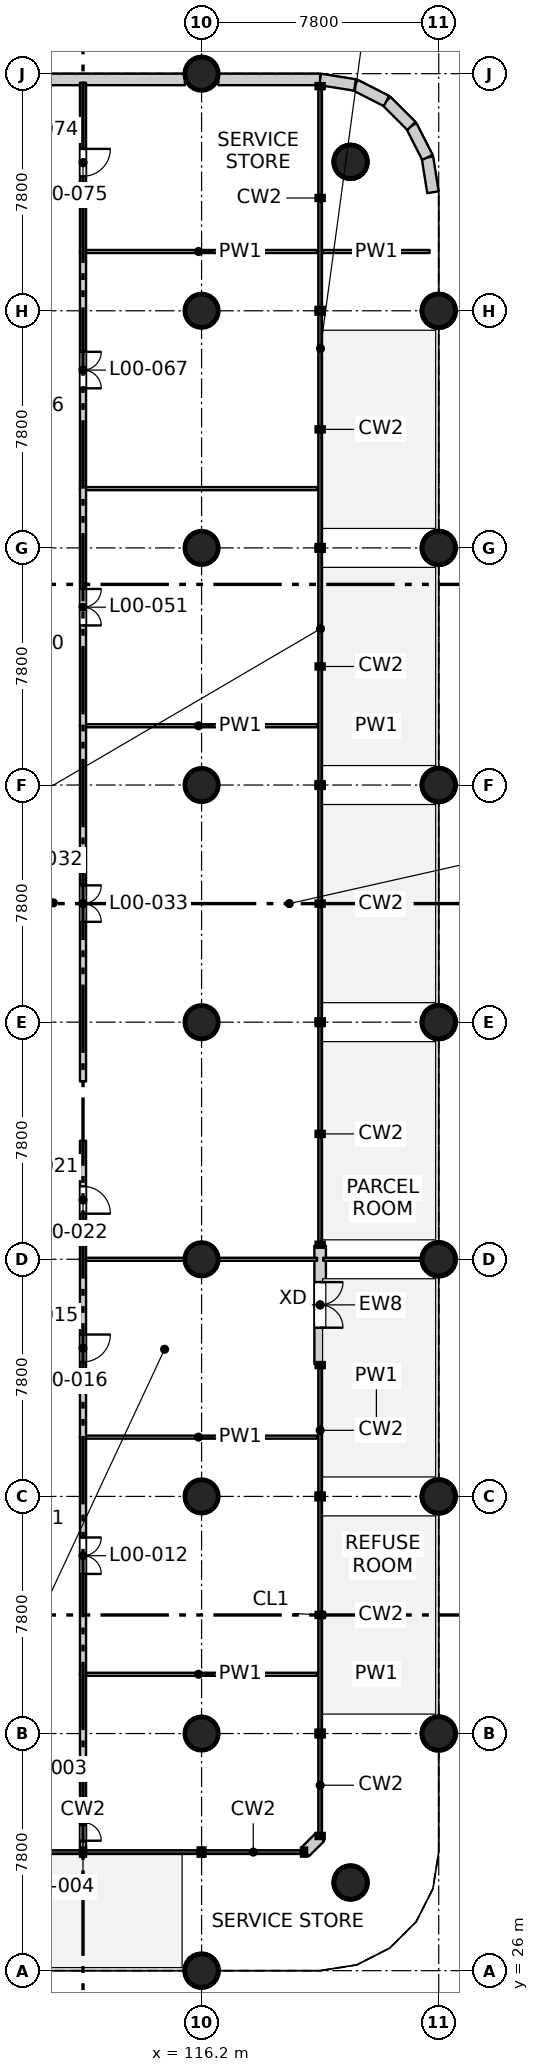
"""IFC4 building model, lengths in metres.
Left out: names, types, materials, properties, quantities, classifications, styles, units other than length and angle.
Written with IfcOpenShell. Run it as: python <this file> out.ifc"""

import sys

from ifc_helpers import new_model, si_unit, direction, frame, frame_2d, origin, origin_2d, place, context, subcontext, project, spatial, rectangle, circle, extrude, element, fill, save


model = new_model("IFC4")
c1 = context("Model", 3, precision=1e-05, world=origin(), true_north=direction((0.0, 1.0)))
c2 = subcontext(c1, "Body", "Model", "MODEL_VIEW")
j1 = project(units=[si_unit("LENGTHUNIT", "METRE"), si_unit("PLANEANGLEUNIT", "RADIAN")], contexts=[c1])
p1 = place(None, origin())
s1 = spatial("IfcSite", under=j1, at=p1, CompositionType="ELEMENT")
p2 = place(p1, origin())
s2 = spatial("IfcBuilding", under=s1, at=p2, CompositionType="ELEMENT")
p3 = place(p2, origin())
s3 = spatial("IfcBuildingStorey", under=s2, at=p3, CompositionType="ELEMENT", Elevation=0.0)
for number, where, z_axis, x_axis in (
    (1, (116.2, 26.0, -0.4), (0.0, 0.0, 1.0), (1.0, 0.0, 0.0)),
    (2, (116.2, 33.8, -0.4), (0.0, 0.0, 1.0), (1.0, 0.0, 0.0)),
    (3, (116.2, 41.6, -0.4), (0.0, 0.0, 1.0), (1.0, 0.0, 0.0)),
    (4, (116.2, 49.4, -0.4), (0.0, 0.0, 1.0), (1.0, 0.0, 0.0)),
    (5, (116.2, 57.2, -0.4), (0.0, 0.0, 1.0), (1.0, 0.0, 0.0)),
    (6, (116.2, 65.0, -0.4), (0.0, 0.0, 1.0), (1.0, 0.0, 0.0)),
    (7, (116.2, 72.8, -0.4), (0.0, 0.0, 1.0), (1.0, 0.0, 0.0)),
    (8, (116.2, 80.6, -0.4), (0.0, 0.0, 1.0), (1.0, 0.0, 0.0)),
    (9, (116.2, 88.4, -0.4), (0.0, 0.0, 1.0), (1.0, 0.0, 0.0)),
    (10, (121.1, 28.9, -0.4), (0.0, 0.0, 1.0), (1.0, 0.0, 0.0)),
    (11, (124.0, 33.8, -0.4), (0.0, 0.0, 1.0), (1.0, 0.0, 0.0)),
    (12, (124.0, 41.6, -0.4), (0.0, 0.0, 1.0), (1.0, 0.0, 0.0)),
    (13, (124.0, 49.4, -0.4), (0.0, 0.0, 1.0), (1.0, 0.0, 0.0)),
    (14, (124.0, 57.2, -0.4), (0.0, 0.0, 1.0), (1.0, 0.0, 0.0)),
    (15, (124.0, 65.0, -0.4), (0.0, 0.0, 1.0), (1.0, 0.0, 0.0)),
    (16, (124.0, 72.8, -0.4), (0.0, 0.0, 1.0), (1.0, 0.0, 0.0)),
    (17, (124.0, 80.6, -0.4), (0.0, 0.0, 1.0), (1.0, 0.0, 0.0)),
    (18, (121.1, 85.5, -0.4), (0.0, 0.0, 1.0), (1.0, 0.0, 0.0)),
):
    element("IfcColumn", number, at=place(p3, frame(where, z_axis=z_axis, x_axis=x_axis)), inside=s3, PredefinedType="COLUMN", context=c2, shape_type="SweptSolid", body=[
        extrude(circle(Radius=0.55, at=origin_2d()), origin(), (0.0, 0.0, 1.0), 6.1),
    ])
p4 = place(p3, frame((120.1, 45.95, 0.0), z_axis=(0.0, 0.0, 1.0), x_axis=(0.0, 1.0, 0.0)))
e19 = element("IfcWall", 19, at=p4, inside=s3, PredefinedType="SOLIDWALL", context=c2, shape_type="SweptSolid", body=[
    extrude(rectangle(XDim=3.9, YDim=0.38, at=frame_2d((1.95, 0.0))), origin(), (0.0, 0.0, 1.0), 5.7),
])
p5 = place(p4, frame((1.2, 0.0, 0.0)))
e20 = element("IfcOpeningElement", 20, at=p5, cuts=e19, PredefinedType="OPENING", context=c2, shape_type="SweptSolid", body=[
    extrude(rectangle(XDim=1.5, YDim=2.4, at=frame_2d((0.75, 1.2))), frame((0.0, 0.2, 0.0), z_axis=(0.0, -1.0, 0.0), x_axis=(1.0, 0.0, 0.0)), (0.0, 0.0, 1.0), 0.4),
])
p6 = place(p3, frame((119.6, 29.9, 0.0), z_axis=(0.0, 0.0, 1.0), x_axis=(0.707106781187, 0.707106781187, 0.0)))
e21 = element("IfcWall", 21, at=p6, inside=s3, PredefinedType="SOLIDWALL", context=c2, shape_type="SweptSolid", body=[
    extrude(rectangle(XDim=0.707, YDim=0.38, at=frame_2d((0.354, 0.0))), origin(), (0.0, 0.0, 1.0), 5.7),
])
p7 = place(p3, frame((101.2, 88.21, 0.0), z_axis=(0.0, 0.0, 1.0), x_axis=(1.0, 0.0, 0.0)))
e22 = element("IfcWall", 22, at=p7, inside=s3, PredefinedType="SOLIDWALL", context=c2, shape_type="SweptSolid", body=[
    extrude(rectangle(XDim=14.45, YDim=0.38, at=frame_2d((7.225, 0.0))), origin(), (0.0, 0.0, 1.0), 5.7),
])
p8 = place(p3, frame((116.75, 88.21, 0.0), z_axis=(0.0, 0.0, 1.0), x_axis=(1.0, 0.0, 0.0)))
e23 = element("IfcWall", 23, at=p8, inside=s3, PredefinedType="SOLIDWALL", context=c2, shape_type="SweptSolid", body=[
    extrude(rectangle(XDim=3.35, YDim=0.38, at=frame_2d((1.675, 0.0))), origin(), (0.0, 0.0, 1.0), 5.7),
])
p9 = place(p3, frame((123.81, 84.5, 0.0), z_axis=(0.0, 0.0, 1.0), x_axis=(-0.156480971952, 0.987680973502, 0.0)))
e24 = element("IfcWall", 24, at=p9, inside=s3, PredefinedType="SOLIDWALL", context=c2, shape_type="SweptSolid", body=[
    extrude(rectangle(XDim=1.161, YDim=0.38, at=frame_2d((0.581, 0.0))), origin(), (0.0, 0.0, 1.0), 5.7),
])
p10 = place(p3, frame((123.628, 85.646, 0.0), z_axis=(0.0, 0.0, 1.0), x_axis=(-0.453932083539, 0.891036286317, 0.0)))
e25 = element("IfcWall", 25, at=p10, inside=s3, PredefinedType="SOLIDWALL", context=c2, shape_type="SweptSolid", body=[
    extrude(rectangle(XDim=1.161, YDim=0.38, at=frame_2d((0.58, 0.0))), origin(), (0.0, 0.0, 1.0), 5.7),
])
for number, where, z_axis, x_axis in (
    (26, (123.102, 86.681, 0.0), (0.0, 0.0, 1.0), (-0.707, 0.707, 0.0)),
    (27, (122.281, 87.501, 0.0), (0.0, 0.0, 1.0), (-0.891, 0.454, 0.0)),
):
    element("IfcWall", number, at=place(p3, frame(where, z_axis=z_axis, x_axis=x_axis)), inside=s3, PredefinedType="SOLIDWALL", context=c2, shape_type="SweptSolid", body=[
        extrude(rectangle(XDim=1.161, YDim=0.38, at=frame_2d((0.581, 0.0))), origin(), (0.0, 0.0, 1.0), 5.7),
    ])
p11 = place(p3, frame((121.246, 88.028, 0.0), z_axis=(0.0, 0.0, 1.0), x_axis=(-0.987675821844, 0.156513484867, 0.0)))
e28 = element("IfcWall", 28, at=p11, inside=s3, PredefinedType="SOLIDWALL", context=c2, shape_type="SweptSolid", body=[
    extrude(rectangle(XDim=1.161, YDim=0.38, at=frame_2d((0.58, 0.0))), origin(), (0.0, 0.0, 1.0), 5.7),
])
p12 = place(p3, frame((112.2, 35.75, 0.0), z_axis=(0.0, 0.0, 1.0), x_axis=(1.0, 0.0, 0.0)))
e29 = element("IfcWall", 29, at=p12, inside=s3, PredefinedType="PARTITIONING", context=c2, shape_type="SweptSolid", body=[
    extrude(rectangle(XDim=7.8, YDim=0.1, at=frame_2d((3.9, 0.0))), origin(), (0.0, 0.0, 1.0), 5.7),
])
p13 = place(p3, frame((120.2, 35.75, 0.0), z_axis=(0.0, 0.0, 1.0), x_axis=(1.0, 0.0, 0.0)))
e30 = element("IfcWall", 30, at=p13, inside=s3, PredefinedType="PARTITIONING", context=c2, shape_type="SweptSolid", body=[
    extrude(rectangle(XDim=3.5, YDim=0.1, at=frame_2d((1.75, 0.0))), origin(), (0.0, 0.0, 1.0), 5.7),
])
p14 = place(p3, frame((112.2, 43.55, 0.0), z_axis=(0.0, 0.0, 1.0), x_axis=(1.0, 0.0, 0.0)))
e31 = element("IfcWall", 31, at=p14, inside=s3, PredefinedType="PARTITIONING", context=c2, shape_type="SweptSolid", body=[
    extrude(rectangle(XDim=7.8, YDim=0.1, at=frame_2d((3.9, 0.0))), origin(), (0.0, 0.0, 1.0), 5.7),
])
p15 = place(p3, frame((120.2, 43.55, 0.0), z_axis=(0.0, 0.0, 1.0), x_axis=(1.0, 0.0, 0.0)))
e32 = element("IfcWall", 32, at=p15, inside=s3, PredefinedType="PARTITIONING", context=c2, shape_type="SweptSolid", body=[
    extrude(rectangle(XDim=3.5, YDim=0.1, at=frame_2d((1.75, 0.0))), origin(), (0.0, 0.0, 1.0), 5.7),
])
p16 = place(p3, frame((112.2, 49.4, 0.0), z_axis=(0.0, 0.0, 1.0), x_axis=(1.0, 0.0, 0.0)))
e33 = element("IfcWall", 33, at=p16, inside=s3, PredefinedType="PARTITIONING", context=c2, shape_type="SweptSolid", body=[
    extrude(rectangle(XDim=7.8, YDim=0.1, at=frame_2d((3.9, 0.0))), origin(), (0.0, 0.0, 1.0), 5.7),
])
p17 = place(p3, frame((120.2, 49.4, 0.0), z_axis=(0.0, 0.0, 1.0), x_axis=(1.0, 0.0, 0.0)))
e34 = element("IfcWall", 34, at=p17, inside=s3, PredefinedType="PARTITIONING", context=c2, shape_type="SweptSolid", body=[
    extrude(rectangle(XDim=3.5, YDim=0.1, at=frame_2d((1.75, 0.0))), origin(), (0.0, 0.0, 1.0), 5.7),
])
p18 = place(p3, frame((112.2, 66.95, 0.0), z_axis=(0.0, 0.0, 1.0), x_axis=(1.0, 0.0, 0.0)))
e35 = element("IfcWall", 35, at=p18, inside=s3, PredefinedType="PARTITIONING", context=c2, shape_type="SweptSolid", body=[
    extrude(rectangle(XDim=7.8, YDim=0.1, at=frame_2d((3.9, 0.0))), origin(), (0.0, 0.0, 1.0), 5.7),
])
p19 = place(p3, frame((120.2, 66.95, 0.0), z_axis=(0.0, 0.0, 1.0), x_axis=(1.0, 0.0, 0.0)))
e36 = element("IfcWall", 36, at=p19, inside=s3, PredefinedType="PARTITIONING", context=c2, shape_type="SweptSolid", body=[
    extrude(rectangle(XDim=3.5, YDim=0.1, at=frame_2d((1.75, 0.0))), origin(), (0.0, 0.0, 1.0), 5.7),
])
p20 = place(p3, frame((112.2, 74.75, 0.0), z_axis=(0.0, 0.0, 1.0), x_axis=(1.0, 0.0, 0.0)))
e37 = element("IfcWall", 37, at=p20, inside=s3, PredefinedType="PARTITIONING", context=c2, shape_type="SweptSolid", body=[
    extrude(rectangle(XDim=7.8, YDim=0.1, at=frame_2d((3.9, 0.0))), origin(), (0.0, 0.0, 1.0), 5.7),
])
p21 = place(p3, frame((120.2, 74.75, 0.0), z_axis=(0.0, 0.0, 1.0), x_axis=(1.0, 0.0, 0.0)))
e38 = element("IfcWall", 38, at=p21, inside=s3, PredefinedType="PARTITIONING", context=c2, shape_type="SweptSolid", body=[
    extrude(rectangle(XDim=3.5, YDim=0.1, at=frame_2d((1.75, 0.0))), origin(), (0.0, 0.0, 1.0), 5.7),
])
p22 = place(p3, frame((112.2, 82.55, 0.0), z_axis=(0.0, 0.0, 1.0), x_axis=(1.0, 0.0, 0.0)))
e39 = element("IfcWall", 39, at=p22, inside=s3, PredefinedType="PARTITIONING", context=c2, shape_type="SweptSolid", body=[
    extrude(rectangle(XDim=7.8, YDim=0.1, at=frame_2d((3.9, 0.0))), origin(), (0.0, 0.0, 1.0), 5.7),
])
p23 = place(p3, frame((120.2, 82.55, 0.0), z_axis=(0.0, 0.0, 1.0), x_axis=(1.0, 0.0, 0.0)))
e40 = element("IfcWall", 40, at=p23, inside=s3, PredefinedType="PARTITIONING", context=c2, shape_type="SweptSolid", body=[
    extrude(rectangle(XDim=3.5, YDim=0.1, at=frame_2d((1.75, 0.0))), origin(), (0.0, 0.0, 1.0), 5.7),
])
p24 = place(p3, frame((112.3, 26.3, 0.0), z_axis=(0.0, 0.0, 1.0), x_axis=(0.0, 1.0, 0.0)))
e41 = element("IfcWall", 41, at=p24, inside=s3, PredefinedType="PARTITIONING", context=c2, shape_type="SweptSolid", body=[
    extrude(rectangle(XDim=3.5, YDim=0.2, at=frame_2d((1.75, 0.0))), origin(), (0.0, 0.0, 1.0), 5.7),
])
p25 = place(p3, frame((112.3, 30.0, 0.0), z_axis=(0.0, 0.0, 1.0), x_axis=(0.0, 1.0, 0.0)))
e42 = element("IfcWall", 42, at=p25, inside=s3, PredefinedType="PARTITIONING", context=c2, shape_type="SweptSolid", body=[
    extrude(rectangle(XDim=23.3, YDim=0.2, at=frame_2d((11.65, 0.0))), origin(), (0.0, 0.0, 1.0), 5.7),
])
p26 = place(p25, frame((0.275, 0.0, 0.0)))
e43 = element("IfcOpeningElement", 43, at=p26, cuts=e42, PredefinedType="OPENING", context=c2, shape_type="SweptSolid", body=[
    extrude(rectangle(XDim=1.2, YDim=2.1, at=frame_2d((0.6, 1.05))), frame((0.0, 0.11, 0.0), z_axis=(0.0, -1.0, 0.0), x_axis=(1.0, 0.0, 0.0)), (0.0, 0.0, 1.0), 0.22),
])
p27 = place(p25, frame((9.05, 0.0, 0.0)))
e44 = element("IfcOpeningElement", 44, at=p27, cuts=e42, PredefinedType="OPENING", context=c2, shape_type="SweptSolid", body=[
    extrude(rectangle(XDim=1.2, YDim=2.1, at=frame_2d((0.6, 1.05))), frame((0.0, 0.11, 0.0), z_axis=(0.0, -1.0, 0.0), x_axis=(1.0, 0.0, 0.0)), (0.0, 0.0, 1.0), 0.22),
])
p28 = place(p25, frame((16.025, 0.0, 0.0)))
e45 = element("IfcOpeningElement", 45, at=p28, cuts=e42, PredefinedType="OPENING", context=c2, shape_type="SweptSolid", body=[
    extrude(rectangle(XDim=0.9, YDim=2.1, at=frame_2d((0.45, 1.05))), frame((0.0, 0.11, 0.0), z_axis=(0.0, -1.0, 0.0), x_axis=(1.0, 0.0, 0.0)), (0.0, 0.0, 1.0), 0.22),
])
p29 = place(p25, frame((20.9, 0.0, 0.0)))
e46 = element("IfcOpeningElement", 46, at=p29, cuts=e42, PredefinedType="OPENING", context=c2, shape_type="SweptSolid", body=[
    extrude(rectangle(XDim=0.9, YDim=2.1, at=frame_2d((0.45, 1.05))), frame((0.0, 0.11, 0.0), z_axis=(0.0, -1.0, 0.0), x_axis=(1.0, 0.0, 0.0)), (0.0, 0.0, 1.0), 0.22),
])
p30 = place(p3, frame((112.3, 55.25, 0.0), z_axis=(0.0, 0.0, 1.0), x_axis=(0.0, 1.0, 0.0)))
e47 = element("IfcWall", 47, at=p30, inside=s3, PredefinedType="PARTITIONING", context=c2, shape_type="SweptSolid", body=[
    extrude(rectangle(XDim=32.85, YDim=0.2, at=frame_2d((16.425, 0.0))), origin(), (0.0, 0.0, 1.0), 5.7),
])
p31 = place(p30, frame((5.25, 0.0, 0.0)))
e48 = element("IfcOpeningElement", 48, at=p31, cuts=e47, PredefinedType="OPENING", context=c2, shape_type="SweptSolid", body=[
    extrude(rectangle(XDim=1.2, YDim=2.1, at=frame_2d((0.6, 1.05))), frame((0.0, 0.11, 0.0), z_axis=(0.0, -1.0, 0.0), x_axis=(1.0, 0.0, 0.0)), (0.0, 0.0, 1.0), 0.22),
])
p32 = place(p30, frame((15.0, 0.0, 0.0)))
e49 = element("IfcOpeningElement", 49, at=p32, cuts=e47, PredefinedType="OPENING", context=c2, shape_type="SweptSolid", body=[
    extrude(rectangle(XDim=1.2, YDim=2.1, at=frame_2d((0.6, 1.05))), frame((0.0, 0.11, 0.0), z_axis=(0.0, -1.0, 0.0), x_axis=(1.0, 0.0, 0.0)), (0.0, 0.0, 1.0), 0.22),
])
p33 = place(p30, frame((22.8, 0.0, 0.0)))
e50 = element("IfcOpeningElement", 50, at=p33, cuts=e47, PredefinedType="OPENING", context=c2, shape_type="SweptSolid", body=[
    extrude(rectangle(XDim=1.2, YDim=2.1, at=frame_2d((0.6, 1.05))), frame((0.0, 0.11, 0.0), z_axis=(0.0, -1.0, 0.0), x_axis=(1.0, 0.0, 0.0)), (0.0, 0.0, 1.0), 0.22),
])
p34 = place(p30, frame((29.775, 0.0, 0.0)))
e51 = element("IfcOpeningElement", 51, at=p34, cuts=e47, PredefinedType="OPENING", context=c2, shape_type="SweptSolid", body=[
    extrude(rectangle(XDim=0.9, YDim=2.1, at=frame_2d((0.45, 1.05))), frame((0.0, 0.11, 0.0), z_axis=(0.0, -1.0, 0.0), x_axis=(1.0, 0.0, 0.0)), (0.0, 0.0, 1.0), 0.22),
])
p35 = place(p5, frame((1.5, 0.0, 0.0), z_axis=(0.0, 0.0, 1.0), x_axis=(-1.0, 0.0, 0.0)))
e52 = element("IfcDoor", 52, at=p35, inside=s3, OperationType="DOUBLE_DOOR_SINGLE_SWING", PredefinedType="DOOR", context=c2, shape_type="SweptSolid", body=[
    extrude(rectangle(XDim=1.5, YDim=2.4, at=frame_2d((0.75, 1.2))), frame((0.0, 0.025, 0.0), z_axis=(0.0, -1.0, 0.0), x_axis=(1.0, 0.0, 0.0)), (0.0, 0.0, 1.0), 0.05),
])
fill(e20, e52)
p36 = place(p26, origin())
e53 = element("IfcDoor", 53, at=p36, inside=s3, OperationType="DOUBLE_DOOR_SINGLE_SWING", PredefinedType="DOOR", context=c2, shape_type="SweptSolid", body=[
    extrude(rectangle(XDim=1.2, YDim=2.1, at=frame_2d((0.6, 1.05))), frame((0.0, 0.025, 0.0), z_axis=(0.0, -1.0, 0.0), x_axis=(1.0, 0.0, 0.0)), (0.0, 0.0, 1.0), 0.05),
])
fill(e43, e53)
p37 = place(p27, origin())
e54 = element("IfcDoor", 54, at=p37, inside=s3, OperationType="DOUBLE_DOOR_SINGLE_SWING", PredefinedType="DOOR", context=c2, shape_type="SweptSolid", body=[
    extrude(rectangle(XDim=1.2, YDim=2.1, at=frame_2d((0.6, 1.05))), frame((0.0, 0.025, 0.0), z_axis=(0.0, -1.0, 0.0), x_axis=(1.0, 0.0, 0.0)), (0.0, 0.0, 1.0), 0.05),
])
fill(e44, e54)
p38 = place(p28, origin())
e55 = element("IfcDoor", 55, at=p38, inside=s3, OperationType="SINGLE_SWING_LEFT", PredefinedType="DOOR", context=c2, shape_type="SweptSolid", body=[
    extrude(rectangle(XDim=0.9, YDim=2.1, at=frame_2d((0.45, 1.05))), frame((0.0, 0.025, 0.0), z_axis=(0.0, -1.0, 0.0), x_axis=(1.0, 0.0, 0.0)), (0.0, 0.0, 1.0), 0.05),
])
fill(e45, e55)
p39 = place(p29, origin())
e56 = element("IfcDoor", 56, at=p39, inside=s3, OperationType="SINGLE_SWING_RIGHT", PredefinedType="DOOR", context=c2, shape_type="SweptSolid", body=[
    extrude(rectangle(XDim=0.9, YDim=2.1, at=frame_2d((0.45, 1.05))), frame((0.0, 0.025, 0.0), z_axis=(0.0, -1.0, 0.0), x_axis=(1.0, 0.0, 0.0)), (0.0, 0.0, 1.0), 0.05),
])
fill(e46, e56)
p40 = place(p31, origin())
e57 = element("IfcDoor", 57, at=p40, inside=s3, OperationType="DOUBLE_DOOR_SINGLE_SWING", PredefinedType="DOOR", context=c2, shape_type="SweptSolid", body=[
    extrude(rectangle(XDim=1.2, YDim=2.1, at=frame_2d((0.6, 1.05))), frame((0.0, 0.025, 0.0), z_axis=(0.0, -1.0, 0.0), x_axis=(1.0, 0.0, 0.0)), (0.0, 0.0, 1.0), 0.05),
])
fill(e48, e57)
p41 = place(p32, origin())
e58 = element("IfcDoor", 58, at=p41, inside=s3, OperationType="DOUBLE_DOOR_SINGLE_SWING", PredefinedType="DOOR", context=c2, shape_type="SweptSolid", body=[
    extrude(rectangle(XDim=1.2, YDim=2.1, at=frame_2d((0.6, 1.05))), frame((0.0, 0.025, 0.0), z_axis=(0.0, -1.0, 0.0), x_axis=(1.0, 0.0, 0.0)), (0.0, 0.0, 1.0), 0.05),
])
fill(e49, e58)
p42 = place(p33, origin())
e59 = element("IfcDoor", 59, at=p42, inside=s3, OperationType="DOUBLE_DOOR_SINGLE_SWING", PredefinedType="DOOR", context=c2, shape_type="SweptSolid", body=[
    extrude(rectangle(XDim=1.2, YDim=2.1, at=frame_2d((0.6, 1.05))), frame((0.0, 0.025, 0.0), z_axis=(0.0, -1.0, 0.0), x_axis=(1.0, 0.0, 0.0)), (0.0, 0.0, 1.0), 0.05),
])
fill(e50, e59)
p43 = place(p34, origin())
e60 = element("IfcDoor", 60, at=p43, inside=s3, OperationType="SINGLE_SWING_LEFT", PredefinedType="DOOR", context=c2, shape_type="SweptSolid", body=[
    extrude(rectangle(XDim=0.9, YDim=2.1, at=frame_2d((0.45, 1.05))), frame((0.0, 0.025, 0.0), z_axis=(0.0, -1.0, 0.0), x_axis=(1.0, 0.0, 0.0)), (0.0, 0.0, 1.0), 0.05),
])
fill(e51, e60)
save(model, sys.argv[1])
